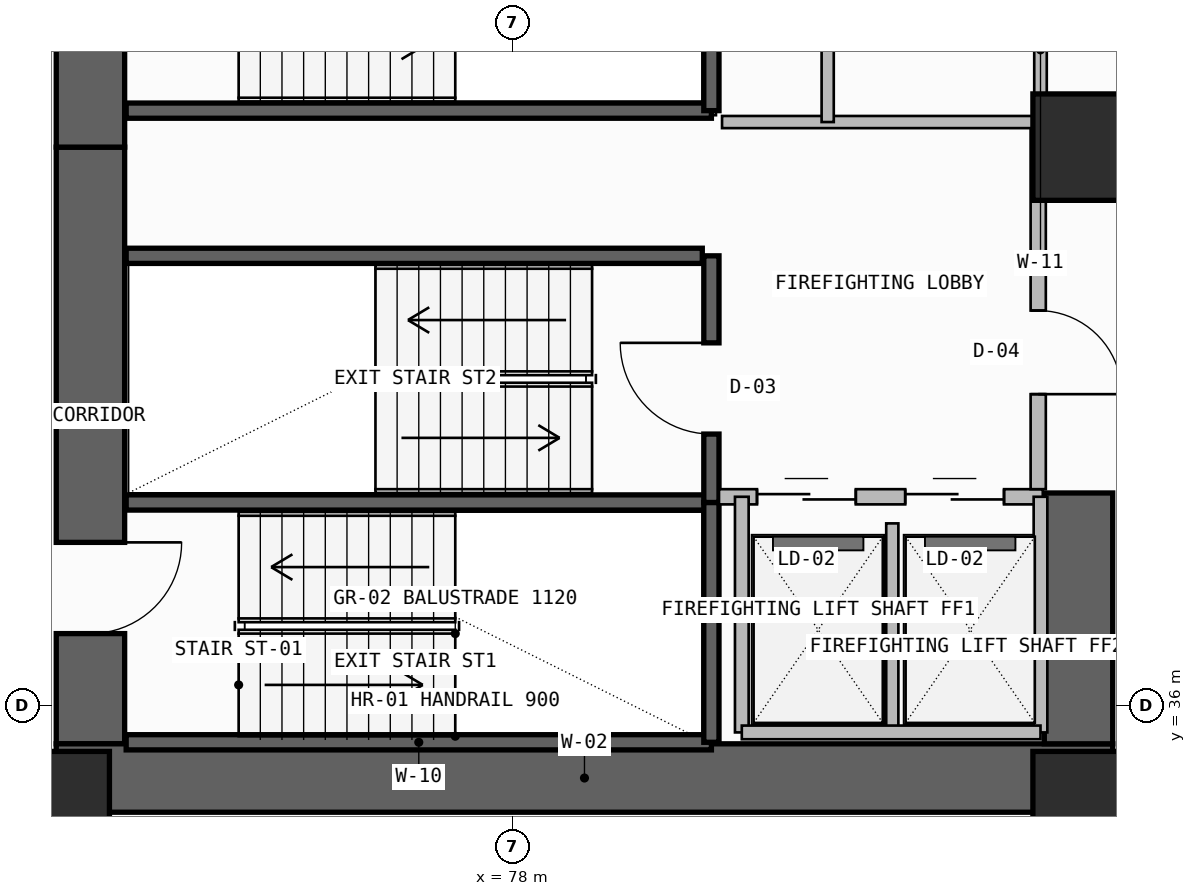
"""IFC4 building model, lengths in metres.
Left out: names, types, materials, properties, quantities, classifications, styles, units other than length and angle.
Written with IfcOpenShell. Run it as: python <this file> out.ifc"""

import sys

from ifc_helpers import new_model, si_unit, direction, frame, frame_2d, origin, origin_2d, place, context, subcontext, project, spatial, rectangle, extrude, element, fill, save


model = new_model("IFC4")
c1 = context("Model", 3, precision=1e-05, world=origin(), true_north=direction((0.0, 1.0)))
c2 = subcontext(c1, "Body", "Model", "MODEL_VIEW")
j1 = project(units=[si_unit("LENGTHUNIT", "METRE"), si_unit("PLANEANGLEUNIT", "RADIAN")], contexts=[c1])
p1 = place(None, origin())
s1 = spatial("IfcSite", under=j1, at=p1, CompositionType="ELEMENT")
p2 = place(p1, origin())
s2 = spatial("IfcBuilding", under=s1, at=p2, CompositionType="ELEMENT")
p3 = place(p2, frame((0.0, 0.0, 117.3)))
s3 = spatial("IfcBuildingStorey", under=s2, at=p3, CompositionType="ELEMENT", Elevation=117.3)
p4 = place(p3, frame((72.45, 35.5, -0.26), z_axis=(0.0, 0.0, 1.0), x_axis=(0.0, 1.0, 0.0)))
e1 = element("IfcWall", 1, at=p4, inside=s3, PredefinedType="SHEAR", context=c2, shape_type="SweptSolid", body=[
    extrude(rectangle(XDim=7.85, YDim=0.9, at=frame_2d((3.925, 0.0))), origin(), (0.0, 0.0, 1.0), 3.6),
])
p5 = place(p4, frame((1.45, 0.0, 0.26)))
e2 = element("IfcOpeningElement", 2, at=p5, cuts=e1, PredefinedType="OPENING", context=c2, shape_type="SweptSolid", body=[
    extrude(rectangle(XDim=1.2, YDim=2.2, at=frame_2d((0.6, 1.1))), frame((0.0, 0.46, 0.0), z_axis=(0.0, -1.0, 0.0), x_axis=(1.0, 0.0, 0.0)), (0.0, 0.0, 1.0), 0.92),
])
p6 = place(p3, frame((72.0, 35.05, -0.26), z_axis=(0.0, 0.0, 1.0), x_axis=(1.0, 0.0, 0.0)))
e3 = element("IfcWall", 3, at=p6, inside=s3, PredefinedType="SHEAR", context=c2, shape_type="SweptSolid", body=[
    extrude(rectangle(XDim=13.9, YDim=0.9, at=frame_2d((6.95, 0.0))), origin(), (0.0, 0.0, 1.0), 3.6),
])
p7 = place(p3, frame((85.45, 35.5, -0.26), z_axis=(0.0, 0.0, 1.0), x_axis=(0.0, 1.0, 0.0)))
e4 = element("IfcWall", 4, at=p7, inside=s3, PredefinedType="SHEAR", context=c2, shape_type="SweptSolid", body=[
    extrude(rectangle(XDim=3.3, YDim=0.9, at=frame_2d((1.65, 0.0))), origin(), (0.0, 0.0, 1.0), 3.6),
])
p8 = place(p3, frame((72.45, 43.35, -0.26), z_axis=(0.0, 0.0, 1.0), x_axis=(0.0, 1.0, 0.0)))
e5 = element("IfcWall", 5, at=p8, inside=s3, PredefinedType="SHEAR", context=c2, shape_type="SweptSolid", body=[
    extrude(rectangle(XDim=12.7, YDim=0.9, at=frame_2d((6.35, 0.0))), origin(), (0.0, 0.0, 1.0), 3.6),
])
p9 = place(p8, frame((1.35, 0.0, 0.26)))
e6 = element("IfcOpeningElement", 6, at=p9, cuts=e5, PredefinedType="OPENING", context=c2, shape_type="SweptSolid", body=[
    extrude(rectangle(XDim=1.2, YDim=2.2, at=frame_2d((0.6, 1.1))), frame((0.0, 0.46, 0.0), z_axis=(0.0, -1.0, 0.0), x_axis=(1.0, 0.0, 0.0)), (0.0, 0.0, 1.0), 0.92),
])
for number, where, z_axis, x_axis in (
    (7, (72.0, 34.7, 0.0), (0.0, 0.0, 1.0), (1.0, 0.0, 0.0)),
    (8, (85.55, 34.7, 0.0), (0.0, 0.0, 1.0), (1.0, 0.0, 0.0)),
    (9, (85.55, 43.35, 0.0), (0.0, 0.0, 1.0), (1.0, 0.0, 0.0)),
):
    element("IfcColumn", number, at=place(p3, frame(where, z_axis=z_axis, x_axis=x_axis)), inside=s3, PredefinedType="COLUMN", context=c2, shape_type="SweptSolid", body=[
        extrude(rectangle(XDim=1.4, YDim=1.4, at=origin_2d()), origin(), (0.0, 0.0, 1.0), 3.6),
    ])
for number, where, z_axis, x_axis in (
    (10, (72.92, 35.52, -0.26), (0.0, 0.0, 1.0), (1.0, 0.0, 0.0)),
    (11, (72.92, 38.675, -0.26), (0.0, 0.0, 1.0), (1.0, 0.0, 0.0)),
):
    element("IfcWall", number, at=place(p3, frame(where, z_axis=z_axis, x_axis=x_axis)), inside=s3, PredefinedType="SOLIDWALL", context=c2, shape_type="SweptSolid", body=[
        extrude(rectangle(XDim=7.7, YDim=0.2, at=frame_2d((3.85, 0.0))), origin(), (0.0, 0.0, 1.0), 3.6),
    ])
p10 = place(p3, frame((80.62, 35.52, -0.26), z_axis=(0.0, 0.0, 1.0), x_axis=(0.0, 1.0, 0.0)))
e12 = element("IfcWall", 12, at=p10, inside=s3, PredefinedType="SOLIDWALL", context=c2, shape_type="SweptSolid", body=[
    extrude(rectangle(XDim=3.155, YDim=0.2, at=frame_2d((1.578, 0.0))), origin(), (0.0, 0.0, 1.0), 3.6),
])
p11 = place(p3, frame((80.62, 38.675, -0.26), z_axis=(0.0, 0.0, 1.0), x_axis=(0.0, 1.0, 0.0)))
e13 = element("IfcWall", 13, at=p11, inside=s3, PredefinedType="SOLIDWALL", context=c2, shape_type="SweptSolid", body=[
    extrude(rectangle(XDim=3.245, YDim=0.2, at=frame_2d((1.623, 0.0))), origin(), (0.0, 0.0, 1.0), 3.6),
])
p12 = place(p11, frame((0.9, 0.0, 0.26)))
e14 = element("IfcOpeningElement", 14, at=p12, cuts=e13, PredefinedType="OPENING", context=c2, shape_type="SweptSolid", body=[
    extrude(rectangle(XDim=1.2, YDim=2.2, at=frame_2d((0.6, 1.1))), frame((0.0, 0.11, 0.0), z_axis=(0.0, -1.0, 0.0), x_axis=(1.0, 0.0, 0.0)), (0.0, 0.0, 1.0), 0.22),
])
p13 = place(p3, frame((80.72, 38.75, 0.0), z_axis=(0.0, 0.0, 1.0), x_axis=(1.0, 0.0, 0.0)))
e15 = element("IfcWall", 15, at=p13, inside=s3, PredefinedType="SOLIDWALL", context=c2, shape_type="SweptSolid", body=[
    extrude(rectangle(XDim=4.26, YDim=0.2, at=frame_2d((2.13, 0.0))), origin(), (0.0, 0.0, 1.0), 3.34),
])
p14 = place(p13, frame((0.5, 0.0, 0.0)))
e16 = element("IfcOpeningElement", 16, at=p14, cuts=e15, PredefinedType="OPENING", context=c2, shape_type="SweptSolid", body=[
    extrude(rectangle(XDim=1.3, YDim=2.3, at=frame_2d((0.65, 1.15))), frame((0.0, 0.11, 0.0), z_axis=(0.0, -1.0, 0.0), x_axis=(1.0, 0.0, 0.0)), (0.0, 0.0, 1.0), 0.22),
])
p15 = place(p13, frame((2.45, 0.0, 0.0)))
e17 = element("IfcOpeningElement", 17, at=p15, cuts=e15, PredefinedType="OPENING", context=c2, shape_type="SweptSolid", body=[
    extrude(rectangle(XDim=1.3, YDim=2.3, at=frame_2d((0.65, 1.15))), frame((0.0, 0.11, 0.0), z_axis=(0.0, -1.0, 0.0), x_axis=(1.0, 0.0, 0.0)), (0.0, 0.0, 1.0), 0.22),
])
p16 = place(p3, frame((83.0, 35.65, 0.0), z_axis=(0.0, 0.0, 1.0), x_axis=(0.0, 1.0, 0.0)))
e18 = element("IfcWall", 18, at=p16, inside=s3, PredefinedType="PLUMBINGWALL", context=c2, shape_type="SweptSolid", body=[
    extrude(rectangle(XDim=2.75, YDim=0.16, at=frame_2d((1.375, 0.0))), origin(), (0.0, 0.0, 1.0), 3.34),
])
for number, where, z_axis, x_axis in (
    (19, (84.95, 35.65, 0.0), (0.0, 0.0, 1.0), (0.0, 1.0, 0.0)),
    (20, (81.02, 35.65, 0.0), (0.0, 0.0, 1.0), (0.0, 1.0, 0.0)),
):
    element("IfcWall", number, at=place(p3, frame(where, z_axis=z_axis, x_axis=x_axis)), inside=s3, PredefinedType="SOLIDWALL", context=c2, shape_type="SweptSolid", body=[
        extrude(rectangle(XDim=3.1, YDim=0.18, at=frame_2d((1.55, 0.0))), origin(), (0.0, 0.0, 1.0), 3.34),
    ])
p17 = place(p3, frame((81.02, 35.65, 0.0), z_axis=(0.0, 0.0, 1.0), x_axis=(1.0, 0.0, 0.0)))
e21 = element("IfcWall", 21, at=p17, inside=s3, PredefinedType="SOLIDWALL", context=c2, shape_type="SweptSolid", body=[
    extrude(rectangle(XDim=3.93, YDim=0.18, at=frame_2d((1.965, 0.0))), origin(), (0.0, 0.0, 1.0), 3.34),
])
p18 = place(p3, frame((84.92, 38.85, 0.0), z_axis=(0.0, 0.0, 1.0), x_axis=(0.0, 1.0, 0.0)))
e22 = element("IfcWall", 22, at=p18, inside=s3, PredefinedType="SOLIDWALL", context=c2, shape_type="SweptSolid", body=[
    extrude(rectangle(XDim=4.83, YDim=0.2, at=frame_2d((2.415, 0.0))), origin(), (0.0, 0.0, 1.0), 3.34),
])
p19 = place(p18, frame((1.25, 0.0, 0.0)))
e23 = element("IfcOpeningElement", 23, at=p19, cuts=e22, PredefinedType="OPENING", context=c2, shape_type="SweptSolid", body=[
    extrude(rectangle(XDim=1.1, YDim=2.2, at=frame_2d((0.55, 1.1))), frame((0.0, 0.11, 0.0), z_axis=(0.0, -1.0, 0.0), x_axis=(1.0, 0.0, 0.0)), (0.0, 0.0, 1.0), 0.22),
])
p20 = place(p3, frame((72.92, 41.92, -0.26), z_axis=(0.0, 0.0, 1.0), x_axis=(1.0, 0.0, 0.0)))
e24 = element("IfcWall", 24, at=p20, inside=s3, PredefinedType="SOLIDWALL", context=c2, shape_type="SweptSolid", body=[
    extrude(rectangle(XDim=7.58, YDim=0.2, at=frame_2d((3.79, 0.0))), origin(), (0.0, 0.0, 1.0), 3.6),
])
p21 = place(p3, frame((72.92, 43.83, -0.26), z_axis=(0.0, 0.0, 1.0), x_axis=(1.0, 0.0, 0.0)))
e25 = element("IfcWall", 25, at=p21, inside=s3, PredefinedType="SOLIDWALL", context=c2, shape_type="SweptSolid", body=[
    extrude(rectangle(XDim=7.7, YDim=0.2, at=frame_2d((3.85, 0.0))), origin(), (0.0, 0.0, 1.0), 3.6),
])
p22 = place(p3, frame((80.62, 43.83, -0.26), z_axis=(0.0, 0.0, 1.0), x_axis=(0.0, 1.0, 0.0)))
e26 = element("IfcWall", 26, at=p22, inside=s3, PredefinedType="SOLIDWALL", context=c2, shape_type="SweptSolid", body=[
    extrude(rectangle(XDim=3.24, YDim=0.2, at=frame_2d((1.62, 0.0))), origin(), (0.0, 0.0, 1.0), 3.6),
])
p23 = place(p3, frame((84.95, 43.68, 0.0), z_axis=(0.0, 0.0, 1.0), x_axis=(0.0, 1.0, 0.0)))
e27 = element("IfcWall", 27, at=p23, inside=s3, PredefinedType="PLUMBINGWALL", context=c2, shape_type="SweptSolid", body=[
    extrude(rectangle(XDim=1.9, YDim=0.165, at=frame_2d((0.95, 0.0))), origin(), (0.0, 0.0, 1.0), 3.34),
])
p24 = place(p3, frame((80.76, 43.68, 0.0), z_axis=(0.0, 0.0, 1.0), x_axis=(1.0, 0.0, 0.0)))
e28 = element("IfcWall", 28, at=p24, inside=s3, PredefinedType="PLUMBINGWALL", context=c2, shape_type="SweptSolid", body=[
    extrude(rectangle(XDim=4.19, YDim=0.16, at=frame_2d((2.095, 0.0))), origin(), (0.0, 0.0, 1.0), 3.34),
])
p25 = place(p3, frame((82.15, 43.68, 0.0), z_axis=(0.0, 0.0, 1.0), x_axis=(0.0, 1.0, 0.0)))
e29 = element("IfcWall", 29, at=p25, inside=s3, PredefinedType="PLUMBINGWALL", context=c2, shape_type="SweptSolid", body=[
    extrude(rectangle(XDim=1.9, YDim=0.16, at=frame_2d((0.95, 0.0))), origin(), (0.0, 0.0, 1.0), 3.34),
])
p26 = place(p5, frame((1.2, 0.0, 0.0), z_axis=(0.0, 0.0, 1.0), x_axis=(-1.0, 0.0, 0.0)))
e30 = element("IfcDoor", 30, at=p26, inside=s3, OperationType="SINGLE_SWING_LEFT", PredefinedType="USERDEFINED", context=c2, shape_type="SweptSolid", body=[
    extrude(rectangle(XDim=1.2, YDim=2.2, at=frame_2d((0.6, 1.1))), frame((0.0, 0.025, 0.0), z_axis=(0.0, -1.0, 0.0), x_axis=(1.0, 0.0, 0.0)), (0.0, 0.0, 1.0), 0.05),
])
fill(e2, e30)
p27 = place(p12, origin())
e31 = element("IfcDoor", 31, at=p27, inside=s3, OperationType="SINGLE_SWING_RIGHT", PredefinedType="USERDEFINED", context=c2, shape_type="SweptSolid", body=[
    extrude(rectangle(XDim=1.2, YDim=2.2, at=frame_2d((0.6, 1.1))), frame((0.0, 0.025, 0.0), z_axis=(0.0, -1.0, 0.0), x_axis=(1.0, 0.0, 0.0)), (0.0, 0.0, 1.0), 0.05),
])
fill(e14, e31)
p28 = place(p14, origin())
e32 = element("IfcDoor", 32, at=p28, inside=s3, OperationType="DOUBLE_DOOR_SLIDING", PredefinedType="DOOR", context=c2, shape_type="SweptSolid", body=[
    extrude(rectangle(XDim=1.3, YDim=2.3, at=frame_2d((0.65, 1.15))), frame((0.0, 0.025, 0.0), z_axis=(0.0, -1.0, 0.0), x_axis=(1.0, 0.0, 0.0)), (0.0, 0.0, 1.0), 0.05),
])
fill(e16, e32)
p29 = place(p15, origin())
e33 = element("IfcDoor", 33, at=p29, inside=s3, OperationType="DOUBLE_DOOR_SLIDING", PredefinedType="DOOR", context=c2, shape_type="SweptSolid", body=[
    extrude(rectangle(XDim=1.3, YDim=2.3, at=frame_2d((0.65, 1.15))), frame((0.0, 0.025, 0.0), z_axis=(0.0, -1.0, 0.0), x_axis=(1.0, 0.0, 0.0)), (0.0, 0.0, 1.0), 0.05),
])
fill(e17, e33)
p30 = place(p19, frame((1.1, 0.0, 0.0), z_axis=(0.0, 0.0, 1.0), x_axis=(-1.0, 0.0, 0.0)))
e34 = element("IfcDoor", 34, at=p30, inside=s3, OperationType="SINGLE_SWING_RIGHT", PredefinedType="DOOR", context=c2, shape_type="SweptSolid", body=[
    extrude(rectangle(XDim=1.1, YDim=2.2, at=frame_2d((0.55, 1.1))), frame((0.0, 0.025, 0.0), z_axis=(0.0, -1.0, 0.0), x_axis=(1.0, 0.0, 0.0)), (0.0, 0.0, 1.0), 0.05),
])
fill(e23, e34)
save(model, sys.argv[1])
